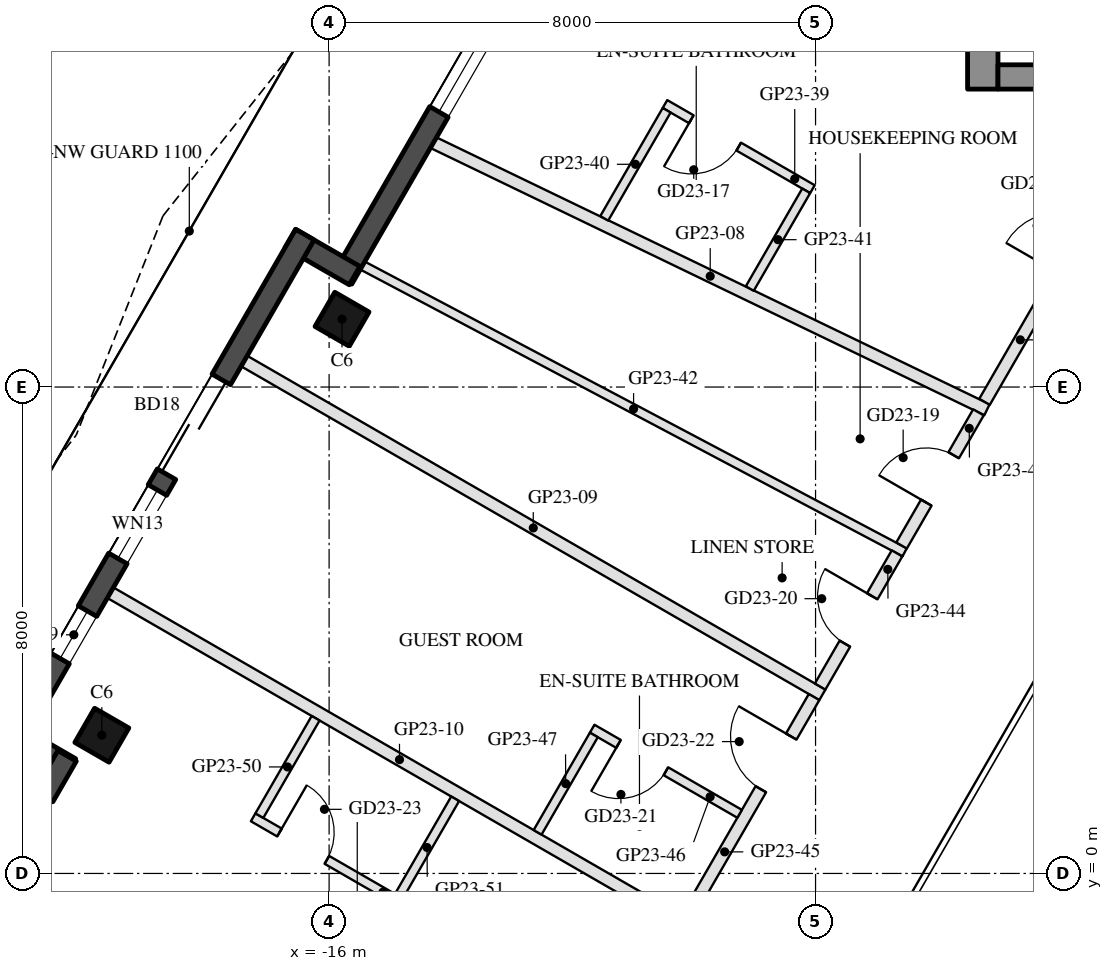
"""IFC4 building model, lengths in metres.
Left out: names, types, materials, properties, quantities, classifications, styles, units other than length and angle.
Written with IfcOpenShell. Run it as: python <this file> out.ifc"""

import sys

from ifc_helpers import new_model, si_unit, direction, frame, frame_2d, origin, origin_2d, place, context, subcontext, project, spatial, rectangle, hollow_rectangle, extrude, element, fill, save


model = new_model("IFC4")
c1 = context("Model", 3, precision=1e-05, world=origin(), true_north=direction((0.0, 1.0)))
c2 = subcontext(c1, "Body", "Model", "MODEL_VIEW")
j1 = project(units=[si_unit("LENGTHUNIT", "METRE"), si_unit("PLANEANGLEUNIT", "RADIAN")], contexts=[c1])
p1 = place(None, origin())
s1 = spatial("IfcSite", under=j1, at=p1, CompositionType="ELEMENT")
p2 = place(p1, origin())
s2 = spatial("IfcBuilding", under=s1, at=p2, CompositionType="ELEMENT")
p3 = place(p2, frame((0.0, 0.0, 246.7)))
s3 = spatial("IfcBuildingStorey", under=s2, at=p3, CompositionType="ELEMENT", Elevation=246.7)
for number, where, z_axis, x_axis in (
    (1, (-15.788, 9.115, 0.0), (0.0, 0.0, 1.0), (0.5, 0.866, 0.0)),
    (2, (-19.738, 2.273, 0.0), (0.0, 0.0, 1.0), (0.5, 0.866, 0.0)),
):
    element("IfcColumn", number, at=place(p3, frame(where, z_axis=z_axis, x_axis=x_axis)), inside=s3, PredefinedType="COLUMN", context=c2, shape_type="SweptSolid", body=[
        extrude(hollow_rectangle(XDim=0.65, YDim=0.65, WallThickness=0.03, at=origin_2d()), origin(), (0.0, 0.0, 1.0), 3.7),
    ])
p4 = place(p3, frame((-12.409, 15.617, 0.0), z_axis=(0.0, 0.0, 1.0), x_axis=(-0.500003597184, -0.866023326939, 0.0)))
e3 = element("IfcWall", 3, at=p4, inside=s3, PredefinedType="SOLIDWALL", context=c2, shape_type="SweptSolid", body=[
    extrude(rectangle(XDim=6.74, YDim=0.35, at=frame_2d((3.37, 0.0))), origin(), (0.0, 0.0, 1.0), 3.55),
])
p5 = place(p4, frame((0.77, 0.0, 0.3)))
e4 = element("IfcOpeningElement", 4, at=p5, cuts=e3, PredefinedType="OPENING", context=c2, shape_type="SweptSolid", body=[
    extrude(rectangle(XDim=2.8, YDim=2.65, at=frame_2d((1.4, 1.325))), frame((0.0, 0.185, 0.0), z_axis=(0.0, -1.0, 0.0), x_axis=(1.0, 0.0, 0.0)), (0.0, 0.0, 1.0), 0.37),
])
p6 = place(p3, frame((-15.581, 9.833, 0.0), z_axis=(0.0, 0.0, 1.0), x_axis=(-0.866055662726, 0.499947586314, 0.0)))
e5 = element("IfcWall", 5, at=p6, inside=s3, PredefinedType="SOLIDWALL", context=c2, shape_type="SweptSolid", body=[
    extrude(rectangle(XDim=1.22, YDim=0.35, at=frame_2d((0.61, 0.0))), origin(), (0.0, 0.0, 1.0), 3.55),
])
p7 = place(p3, frame((-16.398, 10.507, 0.0), z_axis=(0.0, 0.0, 1.0), x_axis=(-0.499999142773, -0.866025898704, 0.0)))
e6 = element("IfcWall", 6, at=p7, inside=s3, PredefinedType="SOLIDWALL", context=c2, shape_type="SweptSolid", body=[
    extrude(rectangle(XDim=9.7, YDim=0.35, at=frame_2d((4.85, 0.0))), origin(), (0.0, 0.0, 1.0), 3.55),
])
p8 = place(p7, frame((2.75, 0.0, 0.0)))
e7 = element("IfcOpeningElement", 7, at=p8, cuts=e6, PredefinedType="OPENING", context=c2, shape_type="SweptSolid", body=[
    extrude(rectangle(XDim=1.8, YDim=2.4, at=frame_2d((0.9, 1.2))), frame((0.0, 0.185, 0.0), z_axis=(0.0, -1.0, 0.0), x_axis=(1.0, 0.0, 0.0)), (0.0, 0.0, 1.0), 0.37),
])
p9 = place(p7, frame((4.85, 0.0, 0.3)))
e8 = element("IfcOpeningElement", 8, at=p9, cuts=e6, PredefinedType="OPENING", context=c2, shape_type="SweptSolid", body=[
    extrude(rectangle(XDim=1.3, YDim=2.65, at=frame_2d((0.65, 1.325))), frame((0.0, 0.185, 0.0), z_axis=(0.0, -1.0, 0.0), x_axis=(1.0, 0.0, 0.0)), (0.0, 0.0, 1.0), 0.37),
])
p10 = place(p7, frame((7.15, 0.0, 0.3)))
e9 = element("IfcOpeningElement", 9, at=p10, cuts=e6, PredefinedType="OPENING", context=c2, shape_type="SweptSolid", body=[
    extrude(rectangle(XDim=0.9, YDim=2.65, at=frame_2d((0.45, 1.325))), frame((0.0, 0.185, 0.0), z_axis=(0.0, -1.0, 0.0), x_axis=(1.0, 0.0, 0.0)), (0.0, 0.0, 1.0), 0.37),
])
p11 = place(p3, frame((-21.312, 2.346, 0.0), z_axis=(0.0, 0.0, 1.0), x_axis=(0.866005645448, -0.500034220881, 0.0)))
e10 = element("IfcWall", 10, at=p11, inside=s3, PredefinedType="SOLIDWALL", context=c2, shape_type="SweptSolid", body=[
    extrude(rectangle(XDim=1.22, YDim=0.35, at=frame_2d((0.61, 0.0))), origin(), (0.0, 0.0, 1.0), 3.55),
])
p12 = place(p3, frame((-20.309, 1.934, 0.0), z_axis=(0.0, 0.0, 1.0), x_axis=(-0.499992114976, -0.866029956157, 0.0)))
e11 = element("IfcWall", 11, at=p12, inside=s3, PredefinedType="SOLIDWALL", context=c2, shape_type="SweptSolid", body=[
    extrude(rectangle(XDim=6.74, YDim=0.35, at=frame_2d((3.37, 0.0))), origin(), (0.0, 0.0, 1.0), 3.55),
])
p13 = place(p12, frame((4.02, 0.0, 0.0)))
e12 = element("IfcOpeningElement", 12, at=p13, cuts=e11, PredefinedType="OPENING", context=c2, shape_type="SweptSolid", body=[
    extrude(rectangle(XDim=2.4, YDim=2.4, at=frame_2d((1.2, 1.2))), frame((0.0, 0.185, 0.0), z_axis=(0.0, -1.0, 0.0), x_axis=(1.0, 0.0, 0.0)), (0.0, 0.0, 1.0), 0.37),
])
p14 = place(p12, frame((0.77, 0.0, 0.3)))
e13 = element("IfcOpeningElement", 13, at=p14, cuts=e11, PredefinedType="OPENING", context=c2, shape_type="SweptSolid", body=[
    extrude(rectangle(XDim=2.9, YDim=2.65, at=frame_2d((1.45, 1.325))), frame((0.0, 0.185, 0.0), z_axis=(0.0, -1.0, 0.0), x_axis=(1.0, 0.0, 0.0)), (0.0, 0.0, 1.0), 0.37),
])
p15 = place(p3, frame((-5.25, 12.9, 0.0), z_axis=(0.0, 0.0, 1.0), x_axis=(0.0, 1.0, 0.0)))
e14 = element("IfcWall", 14, at=p15, inside=s3, PredefinedType="SHEAR", context=c2, shape_type="SweptSolid", body=[
    extrude(rectangle(XDim=14.837, YDim=0.5, at=frame_2d((7.418, 0.0))), origin(), (0.0, 0.0, 1.0), 3.5),
])
p16 = place(p3, frame((5.0, 13.1, 0.0), z_axis=(0.0, 0.0, 1.0), x_axis=(-1.0, 0.0, 0.0)))
e15 = element("IfcWall", 15, at=p16, inside=s3, PredefinedType="SHEAR", context=c2, shape_type="SweptSolid", body=[
    extrude(rectangle(XDim=10.0, YDim=0.4, at=frame_2d((5.0, 0.0))), origin(), (0.0, 0.0, 1.0), 3.5),
])
p17 = place(p16, frame((3.55, 0.0, 0.0)))
e16 = element("IfcOpeningElement", 16, at=p17, cuts=e15, PredefinedType="OPENING", context=c2, shape_type="SweptSolid", body=[
    extrude(rectangle(XDim=1.1, YDim=2.1, at=frame_2d((0.55, 1.05))), frame((0.0, 0.21, 0.0), z_axis=(0.0, -1.0, 0.0), x_axis=(1.0, 0.0, 0.0)), (0.0, 0.0, 1.0), 0.42),
])
p18 = place(p16, frame((5.85, 0.0, 0.0)))
e17 = element("IfcOpeningElement", 17, at=p18, cuts=e15, PredefinedType="OPENING", context=c2, shape_type="SweptSolid", body=[
    extrude(rectangle(XDim=1.4, YDim=2.1, at=frame_2d((0.7, 1.05))), frame((0.0, 0.21, 0.0), z_axis=(0.0, -1.0, 0.0), x_axis=(1.0, 0.0, 0.0)), (0.0, 0.0, 1.0), 0.42),
])
p19 = place(p3, frame((-14.284, 12.019, 0.0), z_axis=(0.0, 0.0, 1.0), x_axis=(0.90065661155, -0.434531550144, 0.0)))
e18 = element("IfcWall", 18, at=p19, inside=s3, PredefinedType="PARTITIONING", context=c2, shape_type="SweptSolid", body=[
    extrude(rectangle(XDim=10.108, YDim=0.2, at=frame_2d((5.054, 0.0))), origin(), (0.0, 0.0, 1.0), 2.95),
])
for number, where, z_axis, x_axis in (
    (19, (-17.397, 8.427, 0.0), (0.0, 0.0, 1.0), (0.866, -0.5, 0.0)),
    (20, (-19.597, 4.617, 0.0), (0.0, 0.0, 1.0), (0.866, -0.5, 0.0)),
):
    element("IfcWall", number, at=place(p3, frame(where, z_axis=z_axis, x_axis=x_axis)), inside=s3, PredefinedType="PARTITIONING", context=c2, shape_type="SweptSolid", body=[
        extrude(rectangle(XDim=10.98, YDim=0.2, at=frame_2d((5.49, 0.0))), origin(), (0.0, 0.0, 1.0), 3.16),
    ])
p20 = place(p3, frame((-5.221, 7.757, 0.0), z_axis=(0.0, 0.0, 1.0), x_axis=(0.49998360248, 0.86603487069, 0.0)))
e21 = element("IfcWall", 21, at=p20, inside=s3, PredefinedType="PARTITIONING", context=c2, shape_type="SweptSolid", body=[
    extrude(rectangle(XDim=5.881, YDim=0.2, at=frame_2d((2.94, 0.0))), origin(), (0.0, 0.0, 1.0), 2.95),
])
p21 = place(p20, frame((2.44, 0.0, 0.0)))
e22 = element("IfcOpeningElement", 22, at=p21, cuts=e21, PredefinedType="OPENING", context=c2, shape_type="SweptSolid", body=[
    extrude(rectangle(XDim=1.0, YDim=2.1, at=frame_2d((0.5, 1.05))), frame((0.0, 0.11, 0.0), z_axis=(0.0, -1.0, 0.0), x_axis=(1.0, 0.0, 0.0)), (0.0, 0.0, 1.0), 0.22),
])
p22 = place(p3, frame((-8.052, 11.254, 0.0), z_axis=(0.0, 0.0, 1.0), x_axis=(-0.865996816683, 0.500049511043, 0.0)))
e23 = element("IfcWall", 23, at=p22, inside=s3, PredefinedType="PARTITIONING", context=c2, shape_type="SweptSolid", body=[
    extrude(rectangle(XDim=2.8, YDim=0.15, at=frame_2d((1.4, 0.0))), origin(), (0.0, 0.0, 1.0), 3.55),
])
p23 = place(p22, frame((1.4, 0.0, 0.0)))
e24 = element("IfcOpeningElement", 24, at=p23, cuts=e23, PredefinedType="OPENING", context=c2, shape_type="SweptSolid", body=[
    extrude(rectangle(XDim=0.9, YDim=2.1, at=frame_2d((0.45, 1.05))), frame((0.0, 0.085, 0.0), z_axis=(0.0, -1.0, 0.0), x_axis=(1.0, 0.0, 0.0)), (0.0, 0.0, 1.0), 0.17),
])
p24 = place(p3, frame((-10.449, 12.552, 0.0), z_axis=(0.0, 0.0, 1.0), x_axis=(-0.500041704412, -0.866001324392, 0.0)))
e25 = element("IfcWall", 25, at=p24, inside=s3, PredefinedType="PARTITIONING", context=c2, shape_type="SweptSolid", body=[
    extrude(rectangle(XDim=2.052, YDim=0.15, at=frame_2d((1.026, 0.0))), origin(), (0.0, 0.0, 1.0), 2.95),
])
p25 = place(p3, frame((-8.154, 11.227, 0.0), z_axis=(0.0, 0.0, 1.0), x_axis=(-0.500086883948, -0.865975235502, 0.0)))
e26 = element("IfcWall", 26, at=p25, inside=s3, PredefinedType="PARTITIONING", context=c2, shape_type="SweptSolid", body=[
    extrude(rectangle(XDim=1.856, YDim=0.15, at=frame_2d((0.928, 0.0))), origin(), (0.0, 0.0, 1.0), 2.95),
])
p26 = place(p3, frame((-15.451, 9.998, 0.0), z_axis=(0.0, 0.0, 1.0), x_axis=(0.883969770247, -0.467544057058, 0.0)))
e27 = element("IfcWall", 27, at=p26, inside=s3, PredefinedType="PARTITIONING", context=c2, shape_type="SweptSolid", body=[
    extrude(rectangle(XDim=10.087, YDim=0.15, at=frame_2d((5.043, 0.0))), origin(), (0.0, 0.0, 1.0), 3.16),
])
p27 = place(p3, frame((-6.585, 5.394, 0.0), z_axis=(0.0, 0.0, 1.0), x_axis=(0.499981564561, 0.866036047228, 0.0)))
e28 = element("IfcWall", 28, at=p27, inside=s3, PredefinedType="PARTITIONING", context=c2, shape_type="SweptSolid", body=[
    extrude(rectangle(XDim=2.528, YDim=0.2, at=frame_2d((1.264, 0.0))), origin(), (0.0, 0.0, 1.0), 2.95),
])
p28 = place(p27, frame((0.814, 0.0, 0.0)))
e29 = element("IfcOpeningElement", 29, at=p28, cuts=e28, PredefinedType="OPENING", context=c2, shape_type="SweptSolid", body=[
    extrude(rectangle(XDim=0.9, YDim=2.1, at=frame_2d((0.45, 1.05))), frame((0.0, 0.11, 0.0), z_axis=(0.0, -1.0, 0.0), x_axis=(1.0, 0.0, 0.0)), (0.0, 0.0, 1.0), 0.22),
])
p29 = place(p3, frame((-7.925, 3.074, 0.0), z_axis=(0.0, 0.0, 1.0), x_axis=(0.499939757307, 0.866060182126, 0.0)))
e30 = element("IfcWall", 30, at=p29, inside=s3, PredefinedType="PARTITIONING", context=c2, shape_type="SweptSolid", body=[
    extrude(rectangle(XDim=2.529, YDim=0.2, at=frame_2d((1.264, 0.0))), origin(), (0.0, 0.0, 1.0), 2.95),
])
p30 = place(p29, frame((0.814, 0.0, 0.0)))
e31 = element("IfcOpeningElement", 31, at=p30, cuts=e30, PredefinedType="OPENING", context=c2, shape_type="SweptSolid", body=[
    extrude(rectangle(XDim=0.9, YDim=2.1, at=frame_2d((0.45, 1.05))), frame((0.0, 0.11, 0.0), z_axis=(0.0, -1.0, 0.0), x_axis=(1.0, 0.0, 0.0)), (0.0, 0.0, 1.0), 0.22),
])
p31 = place(p3, frame((-10.125, -0.736, 0.0), z_axis=(0.0, 0.0, 1.0), x_axis=(0.49998411664, 0.866034573852, 0.0)))
e32 = element("IfcWall", 32, at=p31, inside=s3, PredefinedType="PARTITIONING", context=c2, shape_type="SweptSolid", body=[
    extrude(rectangle(XDim=4.2, YDim=0.2, at=frame_2d((2.1, 0.0))), origin(), (0.0, 0.0, 1.0), 2.95),
])
p32 = place(p31, frame((2.45, 0.0, 0.0)))
e33 = element("IfcOpeningElement", 33, at=p32, cuts=e32, PredefinedType="OPENING", context=c2, shape_type="SweptSolid", body=[
    extrude(rectangle(XDim=1.0, YDim=2.1, at=frame_2d((0.5, 1.05))), frame((0.0, 0.11, 0.0), z_axis=(0.0, -1.0, 0.0), x_axis=(1.0, 0.0, 0.0)), (0.0, 0.0, 1.0), 0.22),
])
p33 = place(p3, frame((-9.249, 0.981, 0.0), z_axis=(0.0, 0.0, 1.0), x_axis=(-0.865996816683, 0.500049511043, 0.0)))
e34 = element("IfcWall", 34, at=p33, inside=s3, PredefinedType="PARTITIONING", context=c2, shape_type="SweptSolid", body=[
    extrude(rectangle(XDim=2.8, YDim=0.15, at=frame_2d((1.4, 0.0))), origin(), (0.0, 0.0, 1.0), 2.95),
])
p34 = place(p33, frame((1.4, 0.0, 0.0)))
e35 = element("IfcOpeningElement", 35, at=p34, cuts=e34, PredefinedType="OPENING", context=c2, shape_type="SweptSolid", body=[
    extrude(rectangle(XDim=0.9, YDim=2.1, at=frame_2d((0.45, 1.05))), frame((0.0, 0.085, 0.0), z_axis=(0.0, -1.0, 0.0), x_axis=(1.0, 0.0, 0.0)), (0.0, 0.0, 1.0), 0.17),
])
p35 = place(p3, frame((-11.646, 2.278, 0.0), z_axis=(0.0, 0.0, 1.0), x_axis=(-0.500042316284, -0.866000971088, 0.0)))
e36 = element("IfcWall", 36, at=p35, inside=s3, PredefinedType="PARTITIONING", context=c2, shape_type="SweptSolid", body=[
    extrude(rectangle(XDim=1.85, YDim=0.15, at=frame_2d((0.925, 0.0))), origin(), (0.0, 0.0, 1.0), 2.95),
])
p36 = place(p3, frame((-17.249, 0.923, 0.0), z_axis=(0.0, 0.0, 1.0), x_axis=(0.866034573852, -0.49998411664, 0.0)))
e37 = element("IfcWall", 37, at=p36, inside=s3, PredefinedType="PARTITIONING", context=c2, shape_type="SweptSolid", body=[
    extrude(rectangle(XDim=2.8, YDim=0.15, at=frame_2d((1.4, 0.0))), origin(), (0.0, 0.0, 1.0), 2.95),
])
p37 = place(p36, frame((0.5, 0.0, 0.0)))
e38 = element("IfcOpeningElement", 38, at=p37, cuts=e37, PredefinedType="OPENING", context=c2, shape_type="SweptSolid", body=[
    extrude(rectangle(XDim=0.9, YDim=2.1, at=frame_2d((0.45, 1.05))), frame((0.0, 0.085, 0.0), z_axis=(0.0, -1.0, 0.0), x_axis=(1.0, 0.0, 0.0)), (0.0, 0.0, 1.0), 0.17),
])
for number, where, z_axis, x_axis in (
    (39, (-16.222, 2.553, 0.0), (0.0, 0.0, 1.0), (-0.5, -0.866, 0.0)),
    (40, (-13.927, 1.228, 0.0), (0.0, 0.0, 1.0), (-0.5, -0.866, 0.0)),
):
    element("IfcWall", number, at=place(p3, frame(where, z_axis=z_axis, x_axis=x_axis)), inside=s3, PredefinedType="PARTITIONING", context=c2, shape_type="SweptSolid", body=[
        extrude(rectangle(XDim=1.85, YDim=0.15, at=frame_2d((0.925, 0.0))), origin(), (0.0, 0.0, 1.0), 3.55),
    ])
p38 = place(p5, origin())
e41 = element("IfcWindow", 41, at=p38, inside=s3, PartitioningType="SINGLE_PANEL", PredefinedType="WINDOW", context=c2, shape_type="SweptSolid", body=[
    extrude(rectangle(XDim=2.8, YDim=2.65, at=frame_2d((1.4, 1.325))), frame((0.0, 0.03, 0.0), z_axis=(0.0, -1.0, 0.0), x_axis=(1.0, 0.0, 0.0)), (0.0, 0.0, 1.0), 0.06),
])
fill(e4, e41)
p39 = place(p8, frame((1.8, 0.0, 0.0), z_axis=(0.0, 0.0, 1.0), x_axis=(-1.0, 0.0, 0.0)))
e42 = element("IfcDoor", 42, at=p39, inside=s3, OperationType="SLIDING_TO_LEFT", PredefinedType="DOOR", context=c2, shape_type="SweptSolid", body=[
    extrude(rectangle(XDim=1.8, YDim=2.4, at=frame_2d((0.9, 1.2))), frame((0.0, 0.025, 0.0), z_axis=(0.0, -1.0, 0.0), x_axis=(1.0, 0.0, 0.0)), (0.0, 0.0, 1.0), 0.05),
])
fill(e7, e42)
p40 = place(p9, origin())
e43 = element("IfcWindow", 43, at=p40, inside=s3, PartitioningType="SINGLE_PANEL", PredefinedType="WINDOW", context=c2, shape_type="SweptSolid", body=[
    extrude(rectangle(XDim=1.3, YDim=2.65, at=frame_2d((0.65, 1.325))), frame((0.0, 0.03, 0.0), z_axis=(0.0, -1.0, 0.0), x_axis=(1.0, 0.0, 0.0)), (0.0, 0.0, 1.0), 0.06),
])
fill(e8, e43)
p41 = place(p10, origin())
e44 = element("IfcWindow", 44, at=p41, inside=s3, PartitioningType="SINGLE_PANEL", PredefinedType="WINDOW", context=c2, shape_type="SweptSolid", body=[
    extrude(rectangle(XDim=0.9, YDim=2.65, at=frame_2d((0.45, 1.325))), frame((0.0, 0.03, 0.0), z_axis=(0.0, -1.0, 0.0), x_axis=(1.0, 0.0, 0.0)), (0.0, 0.0, 1.0), 0.06),
])
fill(e9, e44)
p42 = place(p23, origin())
e45 = element("IfcDoor", 45, at=p42, inside=s3, OperationType="SINGLE_SWING_RIGHT", PredefinedType="DOOR", context=c2, shape_type="SweptSolid", body=[
    extrude(rectangle(XDim=0.9, YDim=2.1, at=frame_2d((0.45, 1.05))), frame((0.0, 0.025, 0.0), z_axis=(0.0, -1.0, 0.0), x_axis=(1.0, 0.0, 0.0)), (0.0, 0.0, 1.0), 0.05),
])
fill(e24, e45)
p43 = place(p28, origin())
e46 = element("IfcDoor", 46, at=p43, inside=s3, OperationType="SINGLE_SWING_LEFT", PredefinedType="DOOR", context=c2, shape_type="SweptSolid", body=[
    extrude(rectangle(XDim=0.9, YDim=2.1, at=frame_2d((0.45, 1.05))), frame((0.0, 0.025, 0.0), z_axis=(0.0, -1.0, 0.0), x_axis=(1.0, 0.0, 0.0)), (0.0, 0.0, 1.0), 0.05),
])
fill(e29, e46)
p44 = place(p30, origin())
e47 = element("IfcDoor", 47, at=p44, inside=s3, OperationType="SINGLE_SWING_RIGHT", PredefinedType="DOOR", context=c2, shape_type="SweptSolid", body=[
    extrude(rectangle(XDim=0.9, YDim=2.1, at=frame_2d((0.45, 1.05))), frame((0.0, 0.025, 0.0), z_axis=(0.0, -1.0, 0.0), x_axis=(1.0, 0.0, 0.0)), (0.0, 0.0, 1.0), 0.05),
])
fill(e31, e47)
p45 = place(p34, origin())
e48 = element("IfcDoor", 48, at=p45, inside=s3, OperationType="SINGLE_SWING_RIGHT", PredefinedType="DOOR", context=c2, shape_type="SweptSolid", body=[
    extrude(rectangle(XDim=0.9, YDim=2.1, at=frame_2d((0.45, 1.05))), frame((0.0, 0.025, 0.0), z_axis=(0.0, -1.0, 0.0), x_axis=(1.0, 0.0, 0.0)), (0.0, 0.0, 1.0), 0.05),
])
fill(e35, e48)
p46 = place(p32, origin())
e49 = element("IfcDoor", 49, at=p46, inside=s3, OperationType="SINGLE_SWING_RIGHT", PredefinedType="DOOR", context=c2, shape_type="SweptSolid", body=[
    extrude(rectangle(XDim=1.0, YDim=2.1, at=frame_2d((0.5, 1.05))), frame((0.0, 0.025, 0.0), z_axis=(0.0, -1.0, 0.0), x_axis=(1.0, 0.0, 0.0)), (0.0, 0.0, 1.0), 0.05),
])
fill(e33, e49)
p47 = place(p37, origin())
e50 = element("IfcDoor", 50, at=p47, inside=s3, OperationType="SINGLE_SWING_LEFT", PredefinedType="DOOR", context=c2, shape_type="SweptSolid", body=[
    extrude(rectangle(XDim=0.9, YDim=2.1, at=frame_2d((0.45, 1.05))), frame((0.0, 0.025, 0.0), z_axis=(0.0, -1.0, 0.0), x_axis=(1.0, 0.0, 0.0)), (0.0, 0.0, 1.0), 0.05),
])
fill(e38, e50)
save(model, sys.argv[1])
